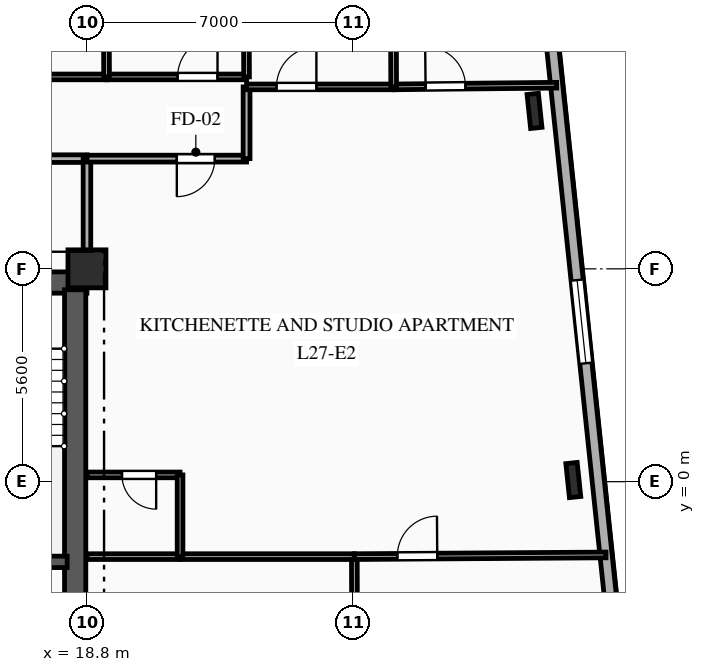
"""IFC4 building model, lengths in metres.
Left out: names, types, materials, properties, quantities, classifications, styles, units other than length and angle.
Written with IfcOpenShell. Run it as: python <this file> out.ifc"""

import sys

from ifc_helpers import new_model, si_unit, direction, frame, frame_2d, origin, origin_2d, place, context, subcontext, project, spatial, rectangle, i_section, extrude, element, fill, save


model = new_model("IFC4")
c1 = context("Model", 3, precision=1e-05, world=origin(), true_north=direction((0.0, 1.0)))
c2 = subcontext(c1, "Body", "Model", "MODEL_VIEW")
j1 = project(units=[si_unit("LENGTHUNIT", "METRE"), si_unit("PLANEANGLEUNIT", "RADIAN")], contexts=[c1])
p1 = place(None, origin())
s1 = spatial("IfcSite", under=j1, at=p1, CompositionType="ELEMENT")
p2 = place(p1, origin())
s2 = spatial("IfcBuilding", under=s1, at=p2, CompositionType="ELEMENT")
p3 = place(p2, frame((0.0, 0.0, 99.1)))
s3 = spatial("IfcBuildingStorey", under=s2, at=p3, CompositionType="ELEMENT", Elevation=99.1)
p4 = place(p3, frame((18.8, 5.6, 0.0), z_axis=(0.0, 0.0, 1.0), x_axis=(1.0, 0.0, 0.0)))
e1 = element("IfcColumn", 1, at=p4, inside=s3, PredefinedType="COLUMN", context=c2, shape_type="SweptSolid", body=[
    extrude(rectangle(XDim=1.0, YDim=1.0, at=origin_2d()), origin(), (0.0, 0.0, 1.0), 3.35),
])
for number, where, z_axis, x_axis in (
    (2, (31.598, 0.043, 0.0), (0.0, 0.0, 1.0), (0.995, 0.105, 0.0)),
    (3, (30.577, 9.756, 0.0), (0.0, 0.0, 1.0), (0.995, 0.105, 0.0)),
):
    element("IfcColumn", number, at=place(p3, frame(where, z_axis=z_axis, x_axis=x_axis)), inside=s3, PredefinedType="COLUMN", context=c2, shape_type="SweptSolid", body=[
        extrude(i_section(OverallWidth=0.3, OverallDepth=0.9, WebThickness=0.019, FlangeThickness=0.035, FilletRadius=0.03, at=origin_2d()), origin(), (0.0, 0.0, 1.0), 3.35),
    ])
p5 = place(p3, frame((30.135, 20.183, 0.0), z_axis=(0.0, 0.0, 1.0), x_axis=(0.104525716865, -0.994522184023, 0.0)))
e4 = element("IfcWall", 4, at=p5, inside=s3, PredefinedType="SOLIDWALL", context=c2, shape_type="SweptSolid", body=[
    extrude(rectangle(XDim=30.6, YDim=0.32, at=frame_2d((15.3, 0.0))), origin(), (0.0, 0.0, 1.0), 3.045),
])
p6 = place(p5, frame((4.342, 0.0, 0.85)))
e5 = element("IfcOpeningElement", 5, at=p6, cuts=e4, PredefinedType="OPENING", context=c2, shape_type="SweptSolid", body=[
    extrude(rectangle(XDim=1.65, YDim=1.85, at=frame_2d((0.825, 0.925))), frame((0.0, 0.17, 0.0), z_axis=(0.0, -1.0, 0.0), x_axis=(1.0, 0.0, 0.0)), (0.0, 0.0, 1.0), 0.34),
])
p7 = place(p5, frame((14.961, 0.0, 0.85)))
e6 = element("IfcOpeningElement", 6, at=p7, cuts=e4, PredefinedType="OPENING", context=c2, shape_type="SweptSolid", body=[
    extrude(rectangle(XDim=2.2, YDim=1.85, at=frame_2d((1.1, 0.925))), frame((0.0, 0.17, 0.0), z_axis=(0.0, -1.0, 0.0), x_axis=(1.0, 0.0, 0.0)), (0.0, 0.0, 1.0), 0.34),
])
p8 = place(p5, frame((25.409, 0.0, 0.85)))
e7 = element("IfcOpeningElement", 7, at=p8, cuts=e4, PredefinedType="OPENING", context=c2, shape_type="SweptSolid", body=[
    extrude(rectangle(XDim=1.65, YDim=1.85, at=frame_2d((0.825, 0.925))), frame((0.0, 0.17, 0.0), z_axis=(0.0, -1.0, 0.0), x_axis=(1.0, 0.0, 0.0)), (0.0, 0.0, 1.0), 0.34),
])
p9 = place(p3, frame((9.2, 5.24, 0.0), z_axis=(0.0, 0.0, 1.0), x_axis=(1.0, 0.0, 0.0)))
e8 = element("IfcWall", 8, at=p9, inside=s3, PredefinedType="SHEAR", context=c2, shape_type="SweptSolid", body=[
    extrude(rectangle(XDim=9.6, YDim=0.56, at=frame_2d((4.8, 0.0))), origin(), (0.0, 0.0, 1.0), 3.045),
])
p10 = place(p9, frame((6.95, 0.0, 0.0)))
e9 = element("IfcOpeningElement", 9, at=p10, cuts=e8, PredefinedType="OPENING", context=c2, shape_type="SweptSolid", body=[
    extrude(rectangle(XDim=1.1, YDim=2.15, at=frame_2d((0.55, 1.075))), frame((0.0, 0.29, 0.0), z_axis=(0.0, -1.0, 0.0), x_axis=(1.0, 0.0, 0.0)), (0.0, 0.0, 1.0), 0.58),
])
p11 = place(p9, frame((3.775, 0.0, 0.0)))
e10 = element("IfcOpeningElement", 10, at=p11, cuts=e8, PredefinedType="OPENING", context=c2, shape_type="SweptSolid", body=[
    extrude(rectangle(XDim=1.05, YDim=2.1, at=frame_2d((0.525, 1.05))), frame((0.0, 0.29, 0.0), z_axis=(0.0, -1.0, 0.0), x_axis=(1.0, 0.0, 0.0)), (0.0, 0.0, 1.0), 0.58),
])
p12 = place(p3, frame((18.49, -5.05, 0.0), z_axis=(0.0, 0.0, 1.0), x_axis=(0.0, 1.0, 0.0)))
e11 = element("IfcWall", 11, at=p12, inside=s3, PredefinedType="SHEAR", context=c2, shape_type="SweptSolid", body=[
    extrude(rectangle(XDim=10.1, YDim=0.56, at=frame_2d((5.05, 0.0))), origin(), (0.0, 0.0, 1.0), 3.045),
])
p13 = place(p3, frame((15.1, -2.11, 0.0), z_axis=(0.0, 0.0, 1.0), x_axis=(1.0, 0.0, 0.0)))
e12 = element("IfcWall", 12, at=p13, inside=s3, PredefinedType="SHEAR", context=c2, shape_type="SweptSolid", body=[
    extrude(rectangle(XDim=3.18, YDim=0.3, at=frame_2d((1.59, 0.0))), origin(), (0.0, 0.0, 1.0), 3.045),
])
p14 = place(p3, frame((18.8, 8.5, 0.0), z_axis=(0.0, 0.0, 1.0), x_axis=(-1.0, 0.0, 0.0)))
e13 = element("IfcWall", 13, at=p14, inside=s3, PredefinedType="PARTITIONING", context=c2, shape_type="SweptSolid", body=[
    extrude(rectangle(XDim=6.8, YDim=0.2, at=frame_2d((3.4, 0.0))), origin(), (0.0, 0.0, 1.0), 3.045),
])
p15 = place(p14, frame((3.985, 0.0, 0.0)))
e14 = element("IfcOpeningElement", 14, at=p15, cuts=e13, PredefinedType="OPENING", context=c2, shape_type="SweptSolid", body=[
    extrude(rectangle(XDim=1.1, YDim=2.15, at=frame_2d((0.55, 1.075))), frame((0.0, 0.11, 0.0), z_axis=(0.0, -1.0, 0.0), x_axis=(1.0, 0.0, 0.0)), (0.0, 0.0, 1.0), 0.22),
])
p16 = place(p3, frame((18.8, 5.6, 0.0), z_axis=(0.0, 0.0, 1.0), x_axis=(0.0, 1.0, 0.0)))
e15 = element("IfcWall", 15, at=p16, inside=s3, PredefinedType="PARTITIONING", context=c2, shape_type="SweptSolid", body=[
    extrude(rectangle(XDim=2.9, YDim=0.2, at=frame_2d((1.45, 0.0))), origin(), (0.0, 0.0, 1.0), 2.53),
])
p17 = place(p3, frame((23.0, 8.5, 0.0), z_axis=(0.0, 0.0, 1.0), x_axis=(-1.0, 0.0, 0.0)))
e16 = element("IfcWall", 16, at=p17, inside=s3, PredefinedType="PARTITIONING", context=c2, shape_type="SweptSolid", body=[
    extrude(rectangle(XDim=4.2, YDim=0.18, at=frame_2d((2.1, 0.0))), origin(), (0.0, 0.0, 1.0), 3.045),
])
p18 = place(p17, frame((0.835, 0.0, 0.0)))
e17 = element("IfcOpeningElement", 17, at=p18, cuts=e16, PredefinedType="OPENING", context=c2, shape_type="SweptSolid", body=[
    extrude(rectangle(XDim=1.0, YDim=2.15, at=frame_2d((0.5, 1.075))), frame((0.0, 0.1, 0.0), z_axis=(0.0, -1.0, 0.0), x_axis=(1.0, 0.0, 0.0)), (0.0, 0.0, 1.0), 0.2),
])
p19 = place(p3, frame((23.0, 10.388, 0.0), z_axis=(0.0, 0.0, 1.0), x_axis=(0.0, -1.0, 0.0)))
e18 = element("IfcWall", 18, at=p19, inside=s3, PredefinedType="PARTITIONING", context=c2, shape_type="SweptSolid", body=[
    extrude(rectangle(XDim=1.888, YDim=0.18, at=frame_2d((0.944, 0.0))), origin(), (0.0, 0.0, 1.0), 3.045),
])
p20 = place(p3, frame((15.633, 10.65, 0.0), z_axis=(0.0, 0.0, 1.0), x_axis=(1.0, 0.0, 0.0)))
e19 = element("IfcWall", 19, at=p20, inside=s3, PredefinedType="PARTITIONING", context=c2, shape_type="SweptSolid", body=[
    extrude(rectangle(XDim=3.683, YDim=0.15, at=frame_2d((1.842, 0.0))), origin(), (0.0, 0.0, 1.0), 3.045),
])
p21 = place(p20, frame((0.764, 0.0, 0.0)))
e20 = element("IfcOpeningElement", 20, at=p21, cuts=e19, PredefinedType="OPENING", context=c2, shape_type="SweptSolid", body=[
    extrude(rectangle(XDim=1.05, YDim=2.15, at=frame_2d((0.525, 1.075))), frame((0.0, 0.085, 0.0), z_axis=(0.0, -1.0, 0.0), x_axis=(1.0, 0.0, 0.0)), (0.0, 0.0, 1.0), 0.17),
])
p22 = place(p3, frame((19.316, 10.65, 0.0), z_axis=(0.0, 0.0, 1.0), x_axis=(1.0, 0.0, 0.0)))
e21 = element("IfcWall", 21, at=p22, inside=s3, PredefinedType="PARTITIONING", context=c2, shape_type="SweptSolid", body=[
    extrude(rectangle(XDim=3.684, YDim=0.15, at=frame_2d((1.842, 0.0))), origin(), (0.0, 0.0, 1.0), 3.045),
])
p23 = place(p22, frame((1.869, 0.0, 0.0)))
e22 = element("IfcOpeningElement", 22, at=p23, cuts=e21, PredefinedType="OPENING", context=c2, shape_type="SweptSolid", body=[
    extrude(rectangle(XDim=1.05, YDim=2.15, at=frame_2d((0.525, 1.075))), frame((0.0, 0.085, 0.0), z_axis=(0.0, -1.0, 0.0), x_axis=(1.0, 0.0, 0.0)), (0.0, 0.0, 1.0), 0.17),
])
p24 = place(p3, frame((25.836, -1.972, 0.0), z_axis=(0.0, 0.0, 1.0), x_axis=(0.003521449358, -0.999993799678, 0.0)))
e23 = element("IfcWall", 23, at=p24, inside=s3, PredefinedType="PARTITIONING", context=c2, shape_type="SweptSolid", body=[
    extrude(rectangle(XDim=12.479, YDim=0.15, at=frame_2d((6.24, 0.0))), origin(), (0.0, 0.0, 1.0), 2.7),
])
p25 = place(p3, frame((21.25, -1.972, 0.0), z_axis=(0.0, 0.0, 1.0), x_axis=(1.0, 0.0, 0.0)))
e24 = element("IfcWall", 24, at=p25, inside=s3, PredefinedType="PARTITIONING", context=c2, shape_type="SweptSolid", body=[
    extrude(rectangle(XDim=4.586, YDim=0.15, at=frame_2d((2.293, 0.0))), origin(), (0.0, 0.0, 1.0), 3.045),
])
p26 = place(p3, frame((18.8, -1.972, 0.0), z_axis=(0.0, 0.0, 1.0), x_axis=(1.0, 0.0, 0.0)))
e25 = element("IfcWall", 25, at=p26, inside=s3, PredefinedType="PLUMBINGWALL", context=c2, shape_type="SweptSolid", body=[
    extrude(rectangle(XDim=2.45, YDim=0.15, at=frame_2d((1.225, 0.0))), origin(), (0.0, 0.0, 1.0), 2.53),
])
p27 = place(p3, frame((25.836, -1.972, 0.0), z_axis=(0.0, 0.0, 1.0), x_axis=(0.999977987715, 0.006635064796, 0.0)))
e26 = element("IfcWall", 26, at=p27, inside=s3, PredefinedType="PARTITIONING", context=c2, shape_type="SweptSolid", body=[
    extrude(rectangle(XDim=6.623, YDim=0.15, at=frame_2d((3.312, 0.0))), origin(), (0.0, 0.0, 1.0), 3.045),
])
p28 = place(p27, frame((1.132, 0.0, 0.0)))
e27 = element("IfcOpeningElement", 27, at=p28, cuts=e26, PredefinedType="OPENING", context=c2, shape_type="SweptSolid", body=[
    extrude(rectangle(XDim=1.05, YDim=2.15, at=frame_2d((0.525, 1.075))), frame((0.0, 0.085, 0.0), z_axis=(0.0, -1.0, 0.0), x_axis=(1.0, 0.0, 0.0)), (0.0, 0.0, 1.0), 0.17),
])
p29 = place(p3, frame((21.25, 0.178, 0.0), z_axis=(0.0, 0.0, 1.0), x_axis=(-1.0, 0.0, 0.0)))
e28 = element("IfcWall", 28, at=p29, inside=s3, PredefinedType="PLUMBINGWALL", context=c2, shape_type="SweptSolid", body=[
    extrude(rectangle(XDim=2.45, YDim=0.15, at=frame_2d((1.225, 0.0))), origin(), (0.0, 0.0, 1.0), 3.045),
])
p30 = place(p29, frame((0.629, 0.0, 0.0)))
e29 = element("IfcOpeningElement", 29, at=p30, cuts=e28, PredefinedType="OPENING", context=c2, shape_type="SweptSolid", body=[
    extrude(rectangle(XDim=0.9, YDim=2.1, at=frame_2d((0.45, 1.05))), frame((0.0, 0.085, 0.0), z_axis=(0.0, -1.0, 0.0), x_axis=(1.0, 0.0, 0.0)), (0.0, 0.0, 1.0), 0.17),
])
p31 = place(p3, frame((21.25, -1.972, 0.0), z_axis=(0.0, 0.0, 1.0), x_axis=(0.0, 1.0, 0.0)))
e30 = element("IfcWall", 30, at=p31, inside=s3, PredefinedType="PLUMBINGWALL", context=c2, shape_type="SweptSolid", body=[
    extrude(rectangle(XDim=2.15, YDim=0.15, at=frame_2d((1.075, 0.0))), origin(), (0.0, 0.0, 1.0), 3.045),
])
p32 = place(p3, frame((23.0, 10.388, 0.0), z_axis=(0.0, 0.0, 1.0), x_axis=(1.0, 0.0, 0.0)))
e31 = element("IfcWall", 31, at=p32, inside=s3, PredefinedType="PARTITIONING", context=c2, shape_type="SweptSolid", body=[
    extrude(rectangle(XDim=3.871, YDim=0.15, at=frame_2d((1.936, 0.0))), origin(), (0.0, 0.0, 1.0), 3.045),
])
p33 = place(p32, frame((0.788, 0.0, 0.0)))
e32 = element("IfcOpeningElement", 32, at=p33, cuts=e31, PredefinedType="OPENING", context=c2, shape_type="SweptSolid", body=[
    extrude(rectangle(XDim=1.05, YDim=2.15, at=frame_2d((0.525, 1.075))), frame((0.0, 0.085, 0.0), z_axis=(0.0, -1.0, 0.0), x_axis=(1.0, 0.0, 0.0)), (0.0, 0.0, 1.0), 0.17),
])
p34 = place(p3, frame((26.871, 10.388, 0.0), z_axis=(0.0, 0.0, 1.0), x_axis=(0.999947502931, 0.010246530259, 0.0)))
e33 = element("IfcWall", 33, at=p34, inside=s3, PredefinedType="PARTITIONING", context=c2, shape_type="SweptSolid", body=[
    extrude(rectangle(XDim=4.289, YDim=0.15, at=frame_2d((2.145, 0.0))), origin(), (0.0, 0.0, 1.0), 3.045),
])
p35 = place(p34, frame((0.84, 0.0, 0.0)))
e34 = element("IfcOpeningElement", 34, at=p35, cuts=e33, PredefinedType="OPENING", context=c2, shape_type="SweptSolid", body=[
    extrude(rectangle(XDim=1.05, YDim=2.15, at=frame_2d((0.525, 1.075))), frame((0.0, 0.085, 0.0), z_axis=(0.0, -1.0, 0.0), x_axis=(1.0, 0.0, 0.0)), (0.0, 0.0, 1.0), 0.17),
])
p36 = place(p3, frame((26.827, 21.545, 0.0), z_axis=(0.0, 0.0, 1.0), x_axis=(0.003938700302, -0.99999224329, 0.0)))
e35 = element("IfcWall", 35, at=p36, inside=s3, PredefinedType="PARTITIONING", context=c2, shape_type="SweptSolid", body=[
    extrude(rectangle(XDim=11.157, YDim=0.15, at=frame_2d((5.579, 0.0))), origin(), (0.0, 0.0, 1.0), 3.045),
])
p37 = place(p3, frame((23.0, 10.65, 0.0), z_axis=(0.0, 0.0, 1.0), x_axis=(-0.0036027147, 0.999993510202, 0.0)))
e36 = element("IfcWall", 36, at=p37, inside=s3, PredefinedType="PARTITIONING", context=c2, shape_type="SweptSolid", body=[
    extrude(rectangle(XDim=12.198, YDim=0.15, at=frame_2d((6.099, 0.0))), origin(), (0.0, 0.0, 1.0), 3.045),
])
p38 = place(p3, frame((19.273, 22.46, 0.0), z_axis=(0.0, 0.0, 1.0), x_axis=(0.003700156578, -0.999993154397, 0.0)))
e37 = element("IfcWall", 37, at=p38, inside=s3, PredefinedType="PARTITIONING", context=c2, shape_type="SweptSolid", body=[
    extrude(rectangle(XDim=11.811, YDim=0.15, at=frame_2d((5.905, 0.0))), origin(), (0.0, 0.0, 1.0), 3.045),
])
p39 = place(p7, origin())
e38 = element("IfcWindow", 38, at=p39, inside=s3, PartitioningType="SINGLE_PANEL", PredefinedType="WINDOW", context=c2, shape_type="SweptSolid", body=[
    extrude(rectangle(XDim=2.2, YDim=1.85, at=frame_2d((1.1, 0.925))), frame((0.0, 0.03, 0.0), z_axis=(0.0, -1.0, 0.0), x_axis=(1.0, 0.0, 0.0)), (0.0, 0.0, 1.0), 0.06),
])
fill(e6, e38)
p40 = place(p18, origin())
e39 = element("IfcDoor", 39, at=p40, inside=s3, OperationType="SINGLE_SWING_RIGHT", PredefinedType="DOOR", context=c2, shape_type="SweptSolid", body=[
    extrude(rectangle(XDim=1.0, YDim=2.15, at=frame_2d((0.5, 1.075))), frame((0.0, 0.025, 0.0), z_axis=(0.0, -1.0, 0.0), x_axis=(1.0, 0.0, 0.0)), (0.0, 0.0, 1.0), 0.05),
])
fill(e17, e39)
p41 = place(p23, origin())
e40 = element("IfcDoor", 40, at=p41, inside=s3, OperationType="SINGLE_SWING_RIGHT", PredefinedType="DOOR", context=c2, shape_type="SweptSolid", body=[
    extrude(rectangle(XDim=1.05, YDim=2.15, at=frame_2d((0.525, 1.075))), frame((0.0, 0.025, 0.0), z_axis=(0.0, -1.0, 0.0), x_axis=(1.0, 0.0, 0.0)), (0.0, 0.0, 1.0), 0.05),
])
fill(e22, e40)
p42 = place(p28, origin())
e41 = element("IfcDoor", 41, at=p42, inside=s3, OperationType="SINGLE_SWING_RIGHT", PredefinedType="DOOR", context=c2, shape_type="SweptSolid", body=[
    extrude(rectangle(XDim=1.05, YDim=2.15, at=frame_2d((0.525, 1.075))), frame((0.0, 0.025, 0.0), z_axis=(0.0, -1.0, 0.0), x_axis=(1.0, 0.0, 0.0)), (0.0, 0.0, 1.0), 0.05),
])
fill(e27, e41)
p43 = place(p30, origin())
e42 = element("IfcDoor", 42, at=p43, inside=s3, OperationType="SINGLE_SWING_LEFT", PredefinedType="DOOR", context=c2, shape_type="SweptSolid", body=[
    extrude(rectangle(XDim=0.9, YDim=2.1, at=frame_2d((0.45, 1.05))), frame((0.0, 0.025, 0.0), z_axis=(0.0, -1.0, 0.0), x_axis=(1.0, 0.0, 0.0)), (0.0, 0.0, 1.0), 0.05),
])
fill(e29, e42)
p44 = place(p33, origin())
e43 = element("IfcDoor", 43, at=p44, inside=s3, OperationType="SINGLE_SWING_RIGHT", PredefinedType="DOOR", context=c2, shape_type="SweptSolid", body=[
    extrude(rectangle(XDim=1.05, YDim=2.15, at=frame_2d((0.525, 1.075))), frame((0.0, 0.025, 0.0), z_axis=(0.0, -1.0, 0.0), x_axis=(1.0, 0.0, 0.0)), (0.0, 0.0, 1.0), 0.05),
])
fill(e32, e43)
p45 = place(p35, origin())
e44 = element("IfcDoor", 44, at=p45, inside=s3, OperationType="SINGLE_SWING_LEFT", PredefinedType="DOOR", context=c2, shape_type="SweptSolid", body=[
    extrude(rectangle(XDim=1.05, YDim=2.15, at=frame_2d((0.525, 1.075))), frame((0.0, 0.025, 0.0), z_axis=(0.0, -1.0, 0.0), x_axis=(1.0, 0.0, 0.0)), (0.0, 0.0, 1.0), 0.05),
])
fill(e34, e44)
save(model, sys.argv[1])
